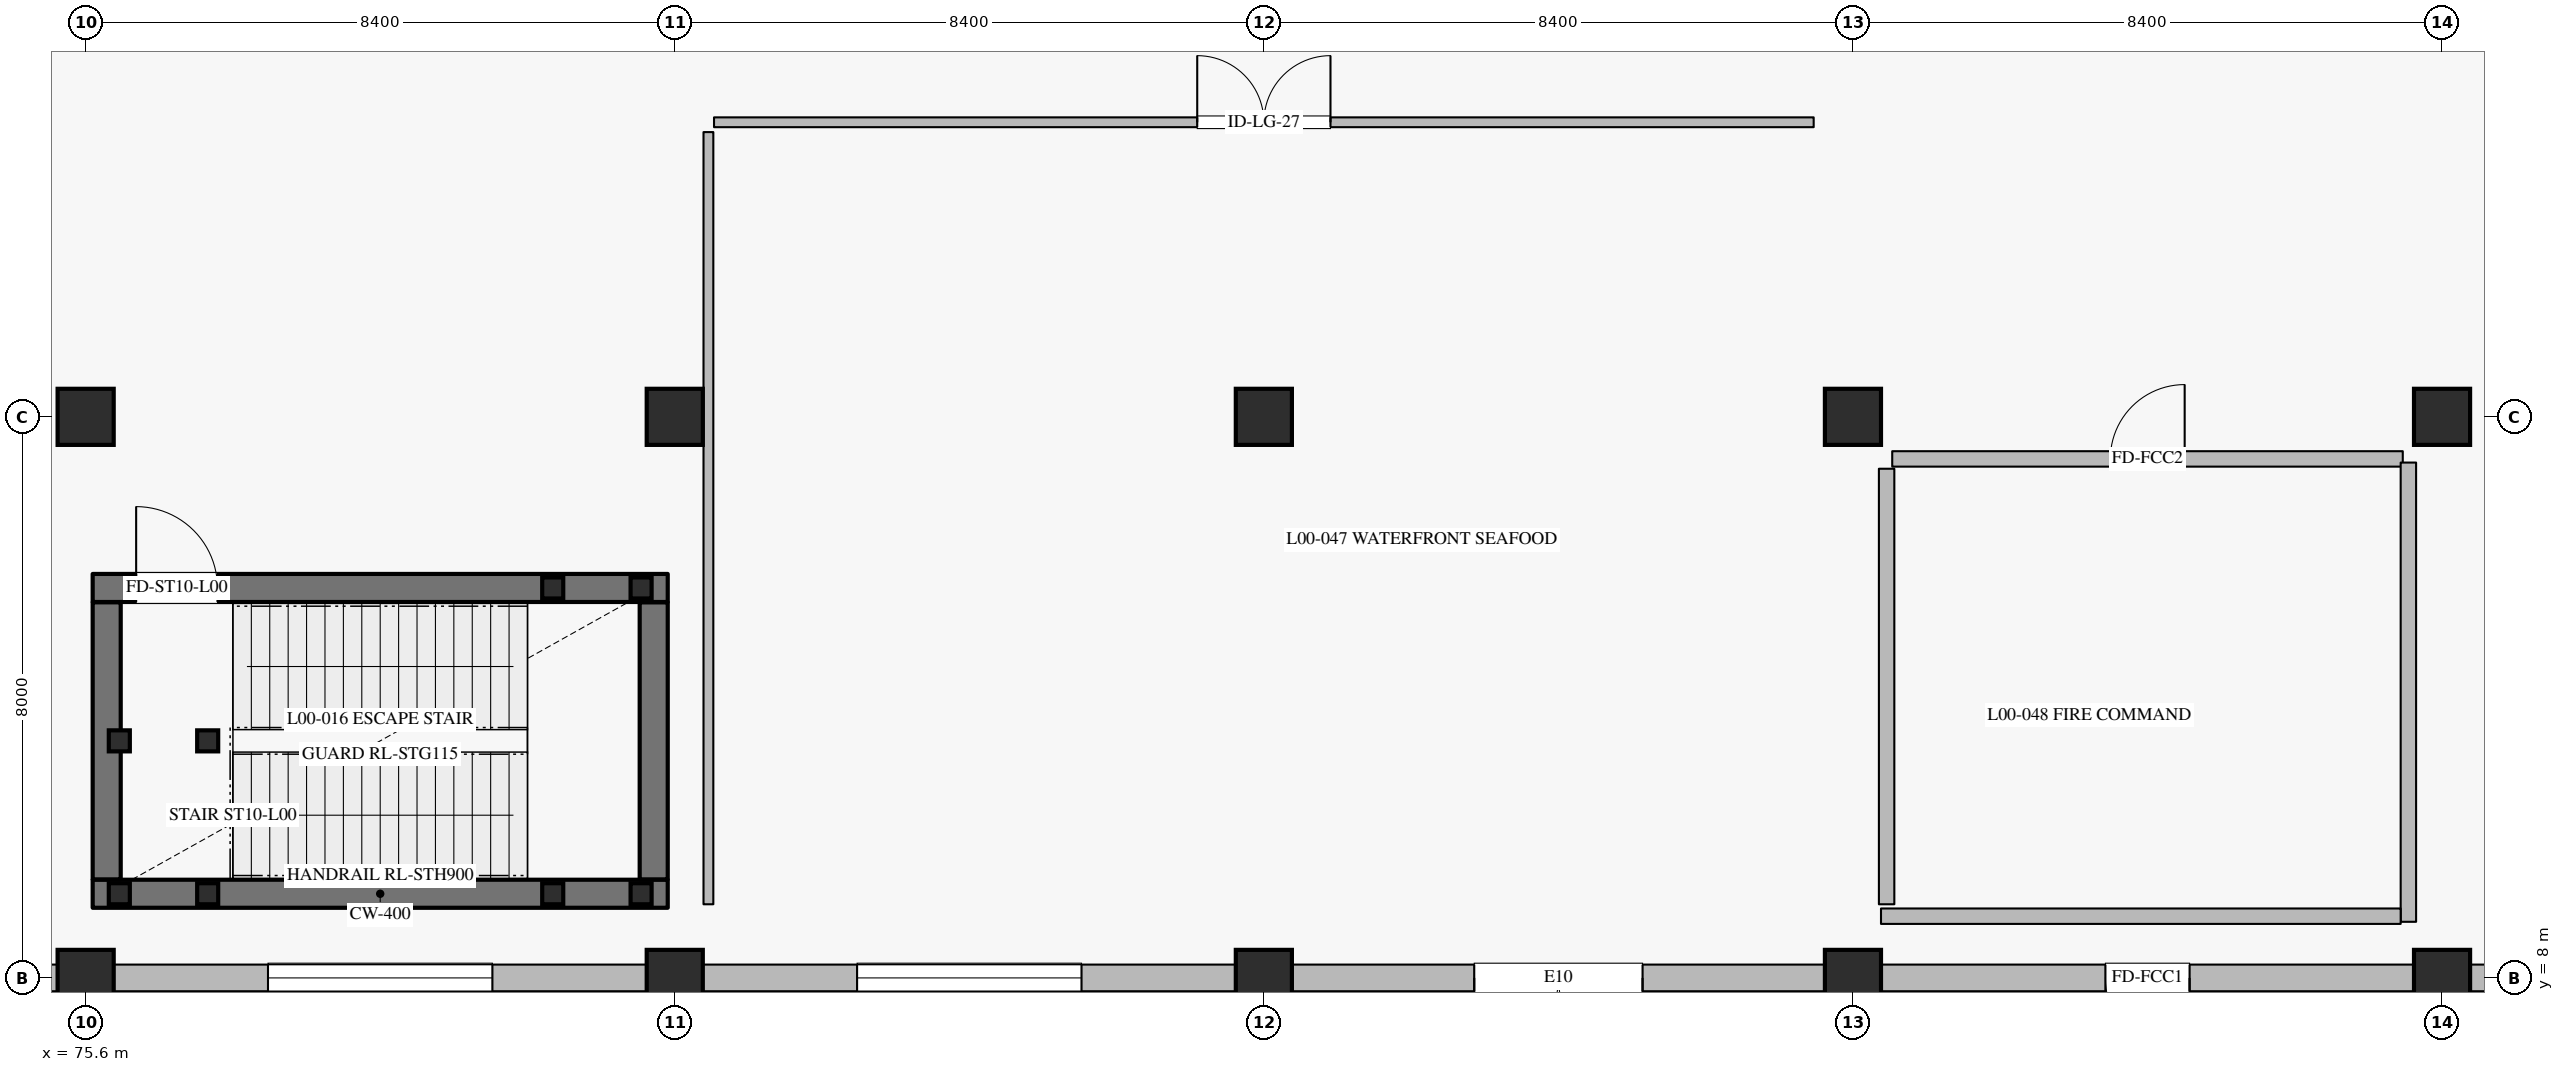
"""IFC4 building model, lengths in metres.
Left out: names, types, materials, properties, quantities, classifications, styles, units other than length and angle.
Written with IfcOpenShell. Run it as: python <this file> out.ifc"""

import sys

from ifc_helpers import new_model, si_unit, direction, frame, frame_2d, origin, origin_2d, place, context, subcontext, project, spatial, rectangle, hollow_rectangle, extrude, element, fill, save


model = new_model("IFC4")
c1 = context("Model", 3, precision=1e-05, world=origin(), true_north=direction((0.0, 1.0)))
c2 = subcontext(c1, "Body", "Model", "MODEL_VIEW")
j1 = project(units=[si_unit("LENGTHUNIT", "METRE"), si_unit("PLANEANGLEUNIT", "RADIAN")], contexts=[c1])
p1 = place(None, origin())
s1 = spatial("IfcSite", under=j1, at=p1, CompositionType="ELEMENT")
p2 = place(p1, origin())
s2 = spatial("IfcBuilding", under=s1, at=p2, CompositionType="ELEMENT")
p3 = place(p2, origin())
s3 = spatial("IfcBuildingStorey", under=s2, at=p3, CompositionType="ELEMENT", Elevation=0.0)
for number, where, z_axis, x_axis in (
    (1, (75.6, 8.0, 0.0), (0.0, 0.0, 1.0), (1.0, 0.0, 0.0)),
    (2, (75.6, 16.0, 0.0), (0.0, 0.0, 1.0), (1.0, 0.0, 0.0)),
    (3, (84.0, 8.0, 0.0), (0.0, 0.0, 1.0), (1.0, 0.0, 0.0)),
    (4, (84.0, 16.0, 0.0), (0.0, 0.0, 1.0), (1.0, 0.0, 0.0)),
    (5, (92.4, 8.0, 0.0), (0.0, 0.0, 1.0), (1.0, 0.0, 0.0)),
    (6, (92.4, 16.0, 0.0), (0.0, 0.0, 1.0), (1.0, 0.0, 0.0)),
    (7, (100.8, 8.0, 0.0), (0.0, 0.0, 1.0), (1.0, 0.0, 0.0)),
    (8, (100.8, 16.0, 0.0), (0.0, 0.0, 1.0), (1.0, 0.0, 0.0)),
    (9, (109.2, 8.0, 0.0), (0.0, 0.0, 1.0), (1.0, 0.0, 0.0)),
    (10, (109.2, 16.0, 0.0), (0.0, 0.0, 1.0), (1.0, 0.0, 0.0)),
):
    element("IfcColumn", number, at=place(p3, frame(where, z_axis=z_axis, x_axis=x_axis)), inside=s3, PredefinedType="COLUMN", context=c2, shape_type="SweptSolid", body=[
        extrude(rectangle(XDim=0.8, YDim=0.8, at=origin_2d()), origin(), (0.0, 0.0, 1.0), 6.0),
    ])
p4 = place(p3, frame((117.225, 8.0, 0.0), z_axis=(0.0, 0.0, 1.0), x_axis=(-1.0, 0.0, 0.0)))
e11 = element("IfcWall", 11, at=p4, inside=s3, PredefinedType="SOLIDWALL", context=c2, shape_type="SweptSolid", body=[
    extrude(rectangle(XDim=7.625, YDim=0.38, at=frame_2d((3.812, 0.0))), origin(), (0.0, 0.0, 1.0), 5.0),
])
p5 = place(p4, frame((2.212, 0.0, 0.95)))
e12 = element("IfcOpeningElement", 12, at=p5, cuts=e11, PredefinedType="OPENING", context=c2, shape_type="SweptSolid", body=[
    extrude(rectangle(XDim=3.2, YDim=2.4, at=frame_2d((1.6, 1.2))), frame((0.0, 0.2, 0.0), z_axis=(0.0, -1.0, 0.0), x_axis=(1.0, 0.0, 0.0)), (0.0, 0.0, 1.0), 0.4),
])
p6 = place(p3, frame((108.8, 8.0, 0.0), z_axis=(0.0, 0.0, 1.0), x_axis=(-1.0, 0.0, 0.0)))
e13 = element("IfcWall", 13, at=p6, inside=s3, PredefinedType="SOLIDWALL", context=c2, shape_type="SweptSolid", body=[
    extrude(rectangle(XDim=7.6, YDim=0.38, at=frame_2d((3.8, 0.0))), origin(), (0.0, 0.0, 1.0), 5.0),
])
p7 = place(p6, frame((3.2, 0.0, 0.0)))
e14 = element("IfcOpeningElement", 14, at=p7, cuts=e13, PredefinedType="OPENING", context=c2, shape_type="SweptSolid", body=[
    extrude(rectangle(XDim=1.2, YDim=2.3, at=frame_2d((0.6, 1.15))), frame((0.0, 0.2, 0.0), z_axis=(0.0, -1.0, 0.0), x_axis=(1.0, 0.0, 0.0)), (0.0, 0.0, 1.0), 0.4),
])
p8 = place(p3, frame((100.4, 8.0, 0.0), z_axis=(0.0, 0.0, 1.0), x_axis=(-1.0, 0.0, 0.0)))
e15 = element("IfcWall", 15, at=p8, inside=s3, PredefinedType="SOLIDWALL", context=c2, shape_type="SweptSolid", body=[
    extrude(rectangle(XDim=7.6, YDim=0.38, at=frame_2d((3.8, 0.0))), origin(), (0.0, 0.0, 1.0), 5.0),
])
p9 = place(p8, frame((2.6, 0.0, 0.0)))
e16 = element("IfcOpeningElement", 16, at=p9, cuts=e15, PredefinedType="OPENING", context=c2, shape_type="SweptSolid", body=[
    extrude(rectangle(XDim=2.4, YDim=2.6, at=frame_2d((1.2, 1.3))), frame((0.0, 0.2, 0.0), z_axis=(0.0, -1.0, 0.0), x_axis=(1.0, 0.0, 0.0)), (0.0, 0.0, 1.0), 0.4),
])
p10 = place(p3, frame((92.0, 8.0, 0.0), z_axis=(0.0, 0.0, 1.0), x_axis=(-1.0, 0.0, 0.0)))
e17 = element("IfcWall", 17, at=p10, inside=s3, PredefinedType="SOLIDWALL", context=c2, shape_type="SweptSolid", body=[
    extrude(rectangle(XDim=7.6, YDim=0.38, at=frame_2d((3.8, 0.0))), origin(), (0.0, 0.0, 1.0), 5.0),
])
p11 = place(p10, frame((2.2, 0.0, 0.95)))
e18 = element("IfcOpeningElement", 18, at=p11, cuts=e17, PredefinedType="OPENING", context=c2, shape_type="SweptSolid", body=[
    extrude(rectangle(XDim=3.2, YDim=2.4, at=frame_2d((1.6, 1.2))), frame((0.0, 0.2, 0.0), z_axis=(0.0, -1.0, 0.0), x_axis=(1.0, 0.0, 0.0)), (0.0, 0.0, 1.0), 0.4),
])
p12 = place(p3, frame((83.6, 8.0, 0.0), z_axis=(0.0, 0.0, 1.0), x_axis=(-1.0, 0.0, 0.0)))
e19 = element("IfcWall", 19, at=p12, inside=s3, PredefinedType="SOLIDWALL", context=c2, shape_type="SweptSolid", body=[
    extrude(rectangle(XDim=7.6, YDim=0.38, at=frame_2d((3.8, 0.0))), origin(), (0.0, 0.0, 1.0), 5.0),
])
p13 = place(p12, frame((2.2, 0.0, 0.95)))
e20 = element("IfcOpeningElement", 20, at=p13, cuts=e19, PredefinedType="OPENING", context=c2, shape_type="SweptSolid", body=[
    extrude(rectangle(XDim=3.2, YDim=2.4, at=frame_2d((1.6, 1.2))), frame((0.0, 0.2, 0.0), z_axis=(0.0, -1.0, 0.0), x_axis=(1.0, 0.0, 0.0)), (0.0, 0.0, 1.0), 0.4),
])
p14 = place(p3, frame((75.2, 8.0, 0.0), z_axis=(0.0, 0.0, 1.0), x_axis=(-1.0, 0.0, 0.0)))
e21 = element("IfcWall", 21, at=p14, inside=s3, PredefinedType="SOLIDWALL", context=c2, shape_type="SweptSolid", body=[
    extrude(rectangle(XDim=7.6, YDim=0.38, at=frame_2d((3.8, 0.0))), origin(), (0.0, 0.0, 1.0), 5.0),
])
p15 = place(p14, frame((2.6, 0.0, 0.0)))
e22 = element("IfcOpeningElement", 22, at=p15, cuts=e21, PredefinedType="OPENING", context=c2, shape_type="SweptSolid", body=[
    extrude(rectangle(XDim=2.4, YDim=2.6, at=frame_2d((1.2, 1.3))), frame((0.0, 0.2, 0.0), z_axis=(0.0, -1.0, 0.0), x_axis=(1.0, 0.0, 0.0)), (0.0, 0.0, 1.0), 0.4),
])
p16 = place(p3, frame((75.7, 9.2, 0.0), z_axis=(0.0, 0.0, 1.0), x_axis=(1.0, 0.0, 0.0)))
e23 = element("IfcWall", 23, at=p16, inside=s3, PredefinedType="SHEAR", context=c2, shape_type="SweptSolid", body=[
    extrude(rectangle(XDim=8.2, YDim=0.4, at=frame_2d((4.1, 0.0))), origin(), (0.0, 0.0, 1.0), 5.675),
])
p17 = place(p3, frame((83.7, 9.405, 0.0), z_axis=(0.0, 0.0, 1.0), x_axis=(0.0, 1.0, 0.0)))
e24 = element("IfcWall", 24, at=p17, inside=s3, PredefinedType="SHEAR", context=c2, shape_type="SweptSolid", body=[
    extrude(rectangle(XDim=3.95, YDim=0.4, at=frame_2d((1.975, 0.0))), origin(), (0.0, 0.0, 1.0), 5.675),
])
p18 = place(p3, frame((75.7, 13.56, 0.0), z_axis=(0.0, 0.0, 1.0), x_axis=(1.0, 0.0, 0.0)))
e25 = element("IfcWall", 25, at=p18, inside=s3, PredefinedType="SHEAR", context=c2, shape_type="SweptSolid", body=[
    extrude(rectangle(XDim=8.2, YDim=0.4, at=frame_2d((4.1, 0.0))), origin(), (0.0, 0.0, 1.0), 5.675),
])
p19 = place(p18, frame((0.62, 0.0, 0.0)))
e26 = element("IfcOpeningElement", 26, at=p19, cuts=e25, PredefinedType="OPENING", context=c2, shape_type="SweptSolid", body=[
    extrude(rectangle(XDim=1.16, YDim=2.2, at=frame_2d((0.58, 1.1))), frame((0.0, 0.21, 0.0), z_axis=(0.0, -1.0, 0.0), x_axis=(1.0, 0.0, 0.0)), (0.0, 0.0, 1.0), 0.42),
])
p20 = place(p3, frame((75.9, 9.405, 0.0), z_axis=(0.0, 0.0, 1.0), x_axis=(0.0, 1.0, 0.0)))
e27 = element("IfcWall", 27, at=p20, inside=s3, PredefinedType="SHEAR", context=c2, shape_type="SweptSolid", body=[
    extrude(rectangle(XDim=3.95, YDim=0.4, at=frame_2d((1.975, 0.0))), origin(), (0.0, 0.0, 1.0), 5.675),
])
for number, where, z_axis, x_axis in (
    (28, (76.08, 9.2, 0.0), (0.0, 0.0, 1.0), (1.0, 0.0, 0.0)),
    (29, (76.08, 11.38, 0.0), (0.0, 0.0, 1.0), (1.0, 0.0, 0.0)),
    (30, (77.34, 9.2, 0.0), (0.0, 0.0, 1.0), (1.0, 0.0, 0.0)),
    (31, (77.34, 11.38, 0.0), (0.0, 0.0, 1.0), (1.0, 0.0, 0.0)),
):
    element("IfcColumn", number, at=place(p3, frame(where, z_axis=z_axis, x_axis=x_axis)), inside=s3, PredefinedType="COLUMN", context=c2, shape_type="SweptSolid", body=[
        extrude(hollow_rectangle(XDim=0.3, YDim=0.3, WallThickness=0.012, at=origin_2d()), origin(), (0.0, 0.0, 1.0), 5.82),
    ])
for number, where, z_axis, x_axis in (
    (32, (82.26, 9.2, -2.7), (0.0, 0.0, 1.0), (1.0, 0.0, 0.0)),
    (33, (82.26, 13.56, -2.7), (0.0, 0.0, 1.0), (1.0, 0.0, 0.0)),
    (34, (83.52, 9.2, -2.7), (0.0, 0.0, 1.0), (1.0, 0.0, 0.0)),
    (35, (83.52, 13.56, -2.7), (0.0, 0.0, 1.0), (1.0, 0.0, 0.0)),
):
    element("IfcColumn", number, at=place(p3, frame(where, z_axis=z_axis, x_axis=x_axis)), inside=s3, PredefinedType="COLUMN", context=c2, shape_type="SweptSolid", body=[
        extrude(hollow_rectangle(XDim=0.3, YDim=0.3, WallThickness=0.012, at=origin_2d()), origin(), (0.0, 0.0, 1.0), 5.52),
    ])
p21 = place(p3, frame((84.56, 20.2, 0.0), z_axis=(0.0, 0.0, 1.0), x_axis=(1.0, 0.0, 0.0)))
e36 = element("IfcWall", 36, at=p21, inside=s3, PredefinedType="PARTITIONING", context=c2, shape_type="SweptSolid", body=[
    extrude(rectangle(XDim=15.68, YDim=0.14, at=frame_2d((7.84, 0.0))), origin(), (0.0, 0.0, 1.0), 5.675),
])
p22 = place(p21, frame((6.89, 0.0, 0.0)))
e37 = element("IfcOpeningElement", 37, at=p22, cuts=e36, PredefinedType="OPENING", context=c2, shape_type="SweptSolid", body=[
    extrude(rectangle(XDim=1.9, YDim=2.4, at=frame_2d((0.95, 1.2))), frame((0.0, 0.08, 0.0), z_axis=(0.0, -1.0, 0.0), x_axis=(1.0, 0.0, 0.0)), (0.0, 0.0, 1.0), 0.16),
])
p23 = place(p3, frame((84.48, 9.05, 0.0), z_axis=(0.0, 0.0, 1.0), x_axis=(0.0, 1.0, 0.0)))
e38 = element("IfcWall", 38, at=p23, inside=s3, PredefinedType="PARTITIONING", context=c2, shape_type="SweptSolid", body=[
    extrude(rectangle(XDim=11.01, YDim=0.14, at=frame_2d((5.505, 0.0))), origin(), (0.0, 0.0, 1.0), 5.675),
])
p24 = place(p3, frame((101.36, 15.4, 0.0), z_axis=(0.0, 0.0, 1.0), x_axis=(1.0, 0.0, 0.0)))
e39 = element("IfcWall", 39, at=p24, inside=s3, PredefinedType="PARTITIONING", context=c2, shape_type="SweptSolid", body=[
    extrude(rectangle(XDim=7.28, YDim=0.22, at=frame_2d((3.64, 0.0))), origin(), (0.0, 0.0, 1.0), 5.675),
])
p25 = place(p24, frame((3.11, 0.0, 0.0)))
e40 = element("IfcOpeningElement", 40, at=p25, cuts=e39, PredefinedType="OPENING", context=c2, shape_type="SweptSolid", body=[
    extrude(rectangle(XDim=1.06, YDim=2.2, at=frame_2d((0.53, 1.1))), frame((0.0, 0.12, 0.0), z_axis=(0.0, -1.0, 0.0), x_axis=(1.0, 0.0, 0.0)), (0.0, 0.0, 1.0), 0.24),
])
p26 = place(p3, frame((101.28, 9.05, 0.0), z_axis=(0.0, 0.0, 1.0), x_axis=(0.0, 1.0, 0.0)))
e41 = element("IfcWall", 41, at=p26, inside=s3, PredefinedType="PARTITIONING", context=c2, shape_type="SweptSolid", body=[
    extrude(rectangle(XDim=6.21, YDim=0.22, at=frame_2d((3.105, 0.0))), origin(), (0.0, 0.0, 1.0), 5.675),
])
p27 = place(p3, frame((108.72, 8.8, 0.0), z_axis=(0.0, 0.0, 1.0), x_axis=(0.0, 1.0, 0.0)))
e42 = element("IfcWall", 42, at=p27, inside=s3, PredefinedType="PARTITIONING", context=c2, shape_type="SweptSolid", body=[
    extrude(rectangle(XDim=6.548, YDim=0.22, at=frame_2d((3.274, 0.0))), origin(), (0.0, 0.0, 1.0), 5.675),
])
p28 = place(p3, frame((101.2, 8.88, 0.0), z_axis=(0.0, 0.0, 1.0), x_axis=(1.0, 0.0, 0.0)))
e43 = element("IfcWall", 43, at=p28, inside=s3, PredefinedType="PARTITIONING", context=c2, shape_type="SweptSolid", body=[
    extrude(rectangle(XDim=7.41, YDim=0.22, at=frame_2d((3.705, 0.0))), origin(), (0.0, 0.0, 1.0), 5.675),
])
p29 = place(p7, origin())
e44 = element("IfcDoor", 44, at=p29, inside=s3, OperationType="SINGLE_SWING_LEFT", PredefinedType="DOOR", context=c2, shape_type="SweptSolid", body=[
    extrude(rectangle(XDim=1.2, YDim=2.3, at=frame_2d((0.6, 1.15))), frame((0.0, 0.025, 0.0), z_axis=(0.0, -1.0, 0.0), x_axis=(1.0, 0.0, 0.0)), (0.0, 0.0, 1.0), 0.05),
])
fill(e14, e44)
p30 = place(p9, origin())
e45 = element("IfcDoor", 45, at=p30, inside=s3, OperationType="DOUBLE_DOOR_SINGLE_SWING", PredefinedType="DOOR", context=c2, shape_type="SweptSolid", body=[
    extrude(rectangle(XDim=2.4, YDim=2.6, at=frame_2d((1.2, 1.3))), frame((0.0, 0.025, 0.0), z_axis=(0.0, -1.0, 0.0), x_axis=(1.0, 0.0, 0.0)), (0.0, 0.0, 1.0), 0.05),
])
fill(e16, e45)
p31 = place(p11, origin())
e46 = element("IfcWindow", 46, at=p31, inside=s3, PartitioningType="DOUBLE_PANEL_VERTICAL", PredefinedType="WINDOW", context=c2, shape_type="SweptSolid", body=[
    extrude(rectangle(XDim=3.2, YDim=2.4, at=frame_2d((1.6, 1.2))), frame((0.0, 0.03, 0.0), z_axis=(0.0, -1.0, 0.0), x_axis=(1.0, 0.0, 0.0)), (0.0, 0.0, 1.0), 0.06),
])
fill(e18, e46)
p32 = place(p13, origin())
e47 = element("IfcWindow", 47, at=p32, inside=s3, PartitioningType="DOUBLE_PANEL_VERTICAL", PredefinedType="WINDOW", context=c2, shape_type="SweptSolid", body=[
    extrude(rectangle(XDim=3.2, YDim=2.4, at=frame_2d((1.6, 1.2))), frame((0.0, 0.03, 0.0), z_axis=(0.0, -1.0, 0.0), x_axis=(1.0, 0.0, 0.0)), (0.0, 0.0, 1.0), 0.06),
])
fill(e20, e47)
p33 = place(p19, origin())
e48 = element("IfcDoor", 48, at=p33, inside=s3, OperationType="SINGLE_SWING_LEFT", PredefinedType="DOOR", context=c2, shape_type="SweptSolid", body=[
    extrude(rectangle(XDim=1.16, YDim=2.2, at=frame_2d((0.58, 1.1))), frame((0.0, 0.025, 0.0), z_axis=(0.0, -1.0, 0.0), x_axis=(1.0, 0.0, 0.0)), (0.0, 0.0, 1.0), 0.05),
])
fill(e26, e48)
p34 = place(p22, origin())
e49 = element("IfcDoor", 49, at=p34, inside=s3, OperationType="DOUBLE_DOOR_SINGLE_SWING", PredefinedType="DOOR", context=c2, shape_type="SweptSolid", body=[
    extrude(rectangle(XDim=1.9, YDim=2.4, at=frame_2d((0.95, 1.2))), frame((0.0, 0.025, 0.0), z_axis=(0.0, -1.0, 0.0), x_axis=(1.0, 0.0, 0.0)), (0.0, 0.0, 1.0), 0.05),
])
fill(e37, e49)
p35 = place(p25, origin())
e50 = element("IfcDoor", 50, at=p35, inside=s3, OperationType="SINGLE_SWING_RIGHT", PredefinedType="DOOR", context=c2, shape_type="SweptSolid", body=[
    extrude(rectangle(XDim=1.06, YDim=2.2, at=frame_2d((0.53, 1.1))), frame((0.0, 0.025, 0.0), z_axis=(0.0, -1.0, 0.0), x_axis=(1.0, 0.0, 0.0)), (0.0, 0.0, 1.0), 0.05),
])
fill(e40, e50)
save(model, sys.argv[1])
